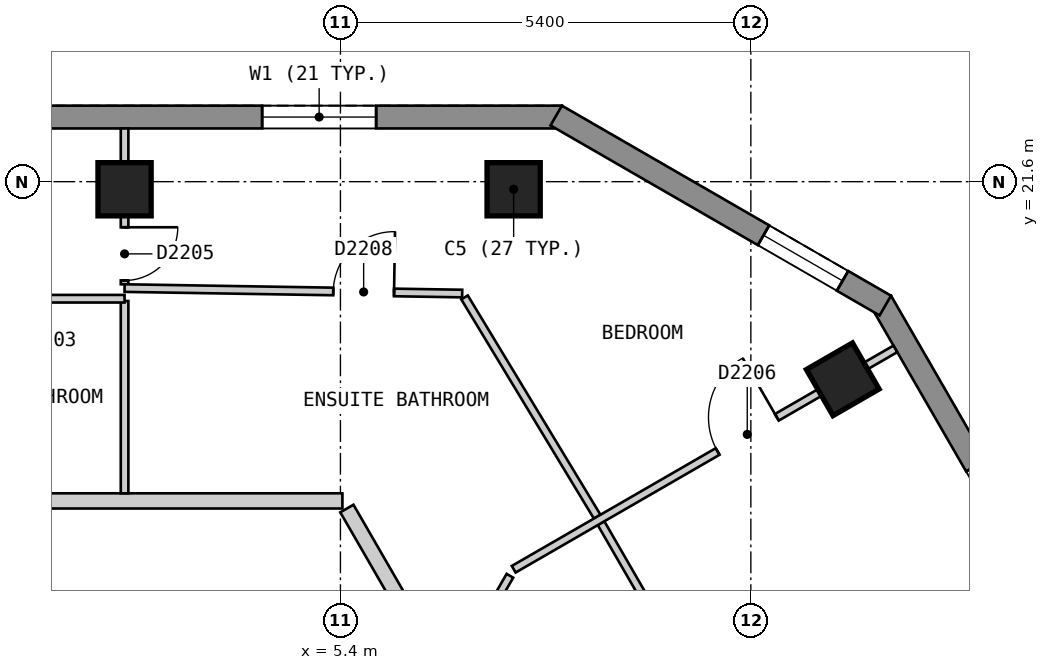
"""IFC4 building model, lengths in metres.
Left out: names, types, materials, properties, quantities, classifications, styles, units other than length and angle.
Written with IfcOpenShell. Run it as: python <this file> out.ifc"""

import sys

from ifc_helpers import new_model, si_unit, direction, frame, frame_2d, origin, origin_2d, place, context, subcontext, project, spatial, polyline, rectangle, outline, extrude, element, fill, save


model = new_model("IFC4")
c1 = context("Model", 3, precision=1e-05, world=origin(), true_north=direction((0.0, 1.0)))
c2 = subcontext(c1, "Body", "Model", "MODEL_VIEW")
j1 = project(units=[si_unit("LENGTHUNIT", "METRE"), si_unit("PLANEANGLEUNIT", "RADIAN")], contexts=[c1])
p1 = place(None, origin())
s1 = spatial("IfcSite", under=j1, at=p1, CompositionType="ELEMENT")
p2 = place(p1, origin())
s2 = spatial("IfcBuilding", under=s1, at=p2, CompositionType="ELEMENT")
p3 = place(p2, frame((0.0, 0.0, 223.8)))
s3 = spatial("IfcBuildingStorey", under=s2, at=p3, CompositionType="ELEMENT", Elevation=223.8)
for number, where, z_axis, x_axis in (
    (1, (7.679, 21.5, 0.0), (0.0, 0.0, 1.0), (-1.0, 0.0, 0.0)),
    (2, (2.56, 21.5, 0.0), (0.0, 0.0, 1.0), (-1.0, 0.0, 0.0)),
    (3, (12.009, 19.0, 0.0), (0.0, 0.0, 1.0), (-0.5, 0.866, 0.0)),
):
    element("IfcColumn", number, at=place(p3, frame(where, z_axis=z_axis, x_axis=x_axis)), inside=s3, PredefinedType="COLUMN", context=c2, shape_type="SweptSolid", body=[
        extrude(rectangle(XDim=0.7, YDim=0.7, at=origin_2d()), origin(), (0.0, 0.0, 1.0), 3.0),
    ])
p4 = place(p3, frame((8.314, 22.45, 0.0), z_axis=(0.0, 0.0, 1.0), x_axis=(-1.0, 0.0, 0.0)))
e4 = element("IfcWall", 4, at=p4, inside=s3, PredefinedType="SOLIDWALL", context=c2, shape_type="SweptSolid", body=[
    extrude(outline(polyline([(0.0, -0.15), (16.628, -0.15), (16.548, 0.15), (0.08, 0.15), (0.0, -0.15)])), origin(), (0.0, 0.0, 1.0), 2.7),
])
p5 = place(p4, frame((2.444, 0.0, 0.15)))
e5 = element("IfcOpeningElement", 5, at=p5, cuts=e4, PredefinedType="OPENING", context=c2, shape_type="SweptSolid", body=[
    extrude(rectangle(XDim=1.5, YDim=2.1, at=frame_2d((0.75, 1.05))), frame((0.0, 0.16, 0.0), z_axis=(0.0, -1.0, 0.0), x_axis=(1.0, 0.0, 0.0)), (0.0, 0.0, 1.0), 0.32),
])
p6 = place(p4, frame((7.564, 0.0, 0.15)))
e6 = element("IfcOpeningElement", 6, at=p6, cuts=e4, PredefinedType="OPENING", context=c2, shape_type="SweptSolid", body=[
    extrude(rectangle(XDim=1.5, YDim=2.1, at=frame_2d((0.75, 1.05))), frame((0.0, 0.16, 0.0), z_axis=(0.0, -1.0, 0.0), x_axis=(1.0, 0.0, 0.0)), (0.0, 0.0, 1.0), 0.32),
])
p7 = place(p4, frame((12.683, 0.0, 0.15)))
e7 = element("IfcOpeningElement", 7, at=p7, cuts=e4, PredefinedType="OPENING", context=c2, shape_type="SweptSolid", body=[
    extrude(rectangle(XDim=1.5, YDim=2.1, at=frame_2d((0.75, 1.05))), frame((0.0, 0.16, 0.0), z_axis=(0.0, -1.0, 0.0), x_axis=(1.0, 0.0, 0.0)), (0.0, 0.0, 1.0), 0.32),
])
p8 = place(p3, frame((23.599, 0.825, 0.0), z_axis=(0.0, 0.0, 1.0), x_axis=(-0.500003656944, 0.866023292436, 0.0)))
e8 = element("IfcWall", 8, at=p8, inside=s3, PredefinedType="SOLIDWALL", context=c2, shape_type="SweptSolid", body=[
    extrude(outline(polyline([(0.0, -0.15), (22.17, -0.15), (22.09, 0.15), (0.08, 0.15), (0.0, -0.15)])), origin(), (0.0, 0.0, 1.0), 2.7),
])
p9 = place(p8, frame((2.497, 0.0, 0.15)))
e9 = element("IfcOpeningElement", 9, at=p9, cuts=e8, PredefinedType="OPENING", context=c2, shape_type="SweptSolid", body=[
    extrude(rectangle(XDim=1.5, YDim=2.1, at=frame_2d((0.75, 1.05))), frame((0.0, 0.16, 0.0), z_axis=(0.0, -1.0, 0.0), x_axis=(1.0, 0.0, 0.0)), (0.0, 0.0, 1.0), 0.32),
])
p10 = place(p8, frame((7.723, 0.0, 0.15)))
e10 = element("IfcOpeningElement", 10, at=p10, cuts=e8, PredefinedType="OPENING", context=c2, shape_type="SweptSolid", body=[
    extrude(rectangle(XDim=1.5, YDim=2.1, at=frame_2d((0.75, 1.05))), frame((0.0, 0.16, 0.0), z_axis=(0.0, -1.0, 0.0), x_axis=(1.0, 0.0, 0.0)), (0.0, 0.0, 1.0), 0.32),
])
p11 = place(p8, frame((12.948, 0.0, 0.15)))
e11 = element("IfcOpeningElement", 11, at=p11, cuts=e8, PredefinedType="OPENING", context=c2, shape_type="SweptSolid", body=[
    extrude(rectangle(XDim=1.5, YDim=2.1, at=frame_2d((0.75, 1.05))), frame((0.0, 0.16, 0.0), z_axis=(0.0, -1.0, 0.0), x_axis=(1.0, 0.0, 0.0)), (0.0, 0.0, 1.0), 0.32),
])
p12 = place(p8, frame((18.173, 0.0, 0.15)))
e12 = element("IfcOpeningElement", 12, at=p12, cuts=e8, PredefinedType="OPENING", context=c2, shape_type="SweptSolid", body=[
    extrude(rectangle(XDim=1.5, YDim=2.1, at=frame_2d((0.75, 1.05))), frame((0.0, 0.16, 0.0), z_axis=(0.0, -1.0, 0.0), x_axis=(1.0, 0.0, 0.0)), (0.0, 0.0, 1.0), 0.32),
])
p13 = place(p3, frame((12.569, 19.97, 0.0), z_axis=(0.0, 0.0, 1.0), x_axis=(-0.866022959057, 0.500004234368, 0.0)))
e13 = element("IfcWall", 13, at=p13, inside=s3, PredefinedType="SOLIDWALL", context=c2, shape_type="SweptSolid", body=[
    extrude(outline(polyline([(0.0, -0.15), (5.0, -0.15), (4.92, 0.15), (0.08, 0.15), (0.0, -0.15)])), origin(), (0.0, 0.0, 1.0), 2.7),
])
p14 = place(p13, frame((0.65, 0.0, 0.15)))
e14 = element("IfcOpeningElement", 14, at=p14, cuts=e13, PredefinedType="OPENING", context=c2, shape_type="SweptSolid", body=[
    extrude(rectangle(XDim=1.2, YDim=2.1, at=frame_2d((0.6, 1.05))), frame((0.0, 0.16, 0.0), z_axis=(0.0, -1.0, 0.0), x_axis=(1.0, 0.0, 0.0)), (0.0, 0.0, 1.0), 0.32),
])
p15 = place(p3, frame((5.485, 17.3, 0.0), z_axis=(0.0, 0.0, 1.0), x_axis=(0.500017221754, -0.866015460572, 0.0)))
e15 = element("IfcWall", 15, at=p15, inside=s3, PredefinedType="PARTITIONING", context=c2, shape_type="SweptSolid", body=[
    extrude(rectangle(XDim=10.468, YDim=0.2, at=frame_2d((5.234, 0.0))), origin(), (0.0, 0.0, 1.0), 2.7),
])
p16 = place(p15, frame((9.092, 0.0, 0.0)))
e16 = element("IfcOpeningElement", 16, at=p16, cuts=e15, PredefinedType="OPENING", context=c2, shape_type="SweptSolid", body=[
    extrude(rectangle(XDim=1.0, YDim=2.1, at=frame_2d((0.5, 1.05))), frame((0.0, 0.11, 0.0), z_axis=(0.0, -1.0, 0.0), x_axis=(1.0, 0.0, 0.0)), (0.0, 0.0, 1.0), 0.22),
])
p17 = place(p3, frame((-5.311, 17.4, 0.0), z_axis=(0.0, 0.0, 1.0), x_axis=(1.0, 0.0, 0.0)))
e17 = element("IfcWall", 17, at=p17, inside=s3, PredefinedType="PARTITIONING", context=c2, shape_type="SweptSolid", body=[
    extrude(rectangle(XDim=10.737, YDim=0.2, at=frame_2d((5.369, 0.0))), origin(), (0.0, 0.0, 1.0), 2.7),
])
p18 = place(p17, frame((4.812, 0.0, 0.0)))
e18 = element("IfcOpeningElement", 18, at=p18, cuts=e17, PredefinedType="OPENING", context=c2, shape_type="SweptSolid", body=[
    extrude(rectangle(XDim=1.0, YDim=2.1, at=frame_2d((0.5, 1.05))), frame((0.0, 0.11, 0.0), z_axis=(0.0, -1.0, 0.0), x_axis=(1.0, 0.0, 0.0)), (0.0, 0.0, 1.0), 0.22),
])
p19 = place(p3, frame((7.033, 20.077, 0.0), z_axis=(0.0, 0.0, 1.0), x_axis=(0.517730137343, -0.855543981854, 0.0)))
e19 = element("IfcWall", 19, at=p19, inside=s3, PredefinedType="PARTITIONING", context=c2, shape_type="SweptSolid", body=[
    extrude(rectangle(XDim=3.371, YDim=0.1, at=frame_2d((1.685, 0.0))), origin(), (0.0, 0.0, 1.0), 2.7),
])
p20 = place(p3, frame((8.829, 17.107, 0.0), z_axis=(0.0, 0.0, 1.0), x_axis=(0.500035512416, -0.866004899711, 0.0)))
e20 = element("IfcWall", 20, at=p20, inside=s3, PredefinedType="PARTITIONING", context=c2, shape_type="SweptSolid", body=[
    extrude(rectangle(XDim=5.175, YDim=0.1, at=frame_2d((2.588, 0.0))), origin(), (0.0, 0.0, 1.0), 2.7),
])
p21 = place(p20, frame((2.163, 0.0, 0.0)))
e21 = element("IfcOpeningElement", 21, at=p21, cuts=e20, PredefinedType="OPENING", context=c2, shape_type="SweptSolid", body=[
    extrude(rectangle(XDim=0.8, YDim=2.1, at=frame_2d((0.4, 1.05))), frame((0.0, 0.06, 0.0), z_axis=(0.0, -1.0, 0.0), x_axis=(1.0, 0.0, 0.0)), (0.0, 0.0, 1.0), 0.12),
])
p22 = place(p3, frame((2.56, 22.3, 0.0), z_axis=(0.0, 0.0, 1.0), x_axis=(0.0, -1.0, 0.0)))
e22 = element("IfcWall", 22, at=p22, inside=s3, PredefinedType="PARTITIONING", context=c2, shape_type="SweptSolid", body=[
    extrude(rectangle(XDim=2.05, YDim=0.1, at=frame_2d((1.025, 0.0))), origin(), (0.0, 0.0, 1.0), 2.7),
])
p23 = place(p22, frame((1.3, 0.0, 0.0)))
e23 = element("IfcOpeningElement", 23, at=p23, cuts=e22, PredefinedType="OPENING", context=c2, shape_type="SweptSolid", body=[
    extrude(rectangle(XDim=0.7, YDim=2.1, at=frame_2d((0.35, 1.05))), frame((0.0, 0.06, 0.0), z_axis=(0.0, -1.0, 0.0), x_axis=(1.0, 0.0, 0.0)), (0.0, 0.0, 1.0), 0.12),
])
p24 = place(p3, frame((2.56, 20.03, 0.0), z_axis=(0.0, 0.0, 1.0), x_axis=(0.0, -1.0, 0.0)))
e24 = element("IfcWall", 24, at=p24, inside=s3, PredefinedType="PARTITIONING", context=c2, shape_type="SweptSolid", body=[
    extrude(rectangle(XDim=2.53, YDim=0.1, at=frame_2d((1.265, 0.0))), origin(), (0.0, 0.0, 1.0), 2.7),
])
p25 = place(p3, frame((2.56, 20.2, 0.0), z_axis=(0.0, 0.0, 1.0), x_axis=(0.999868576801, -0.016212005615, 0.0)))
e25 = element("IfcWall", 25, at=p25, inside=s3, PredefinedType="PARTITIONING", context=c2, shape_type="SweptSolid", body=[
    extrude(rectangle(XDim=4.442, YDim=0.1, at=frame_2d((2.221, 0.0))), origin(), (0.0, 0.0, 1.0), 2.7),
])
p26 = place(p25, frame((2.746, 0.0, 0.0)))
e26 = element("IfcOpeningElement", 26, at=p26, cuts=e25, PredefinedType="OPENING", context=c2, shape_type="SweptSolid", body=[
    extrude(rectangle(XDim=0.8, YDim=2.1, at=frame_2d((0.4, 1.05))), frame((0.0, 0.06, 0.0), z_axis=(0.0, -1.0, 0.0), x_axis=(1.0, 0.0, 0.0)), (0.0, 0.0, 1.0), 0.12),
])
p27 = place(p3, frame((-0.716, 20.06, 0.0), z_axis=(0.0, 0.0, 1.0), x_axis=(1.0, 0.0, 0.0)))
e27 = element("IfcWall", 27, at=p27, inside=s3, PredefinedType="PARTITIONING", context=c2, shape_type="SweptSolid", body=[
    extrude(rectangle(XDim=3.276, YDim=0.1, at=frame_2d((1.638, 0.0))), origin(), (0.0, 0.0, 1.0), 2.7),
])
p28 = place(p3, frame((6.871, 15.1, 0.0), z_axis=(0.0, 0.0, 1.0), x_axis=(0.499805980977, 0.866137391745, 0.0)))
e28 = element("IfcWall", 28, at=p28, inside=s3, PredefinedType="PARTITIONING", context=c2, shape_type="SweptSolid", body=[
    extrude(rectangle(XDim=1.518, YDim=0.1, at=frame_2d((0.759, 0.0))), origin(), (0.0, 0.0, 1.0), 2.7),
])
p29 = place(p3, frame((7.68, 16.501, 0.0), z_axis=(0.0, 0.0, 1.0), x_axis=(0.86602149507, 0.500006770031, 0.0)))
e29 = element("IfcWall", 29, at=p29, inside=s3, PredefinedType="PARTITIONING", context=c2, shape_type="SweptSolid", body=[
    extrude(rectangle(XDim=5.798, YDim=0.1, at=frame_2d((2.899, 0.0))), origin(), (0.0, 0.0, 1.0), 2.7),
])
p30 = place(p29, frame((3.098, 0.0, 0.0)))
e30 = element("IfcOpeningElement", 30, at=p30, cuts=e29, PredefinedType="OPENING", context=c2, shape_type="SweptSolid", body=[
    extrude(rectangle(XDim=0.9, YDim=2.1, at=frame_2d((0.45, 1.05))), frame((0.0, 0.06, 0.0), z_axis=(0.0, -1.0, 0.0), x_axis=(1.0, 0.0, 0.0)), (0.0, 0.0, 1.0), 0.12),
])
p31 = place(p5, origin())
e31 = element("IfcWindow", 31, at=p31, inside=s3, PartitioningType="SINGLE_PANEL", PredefinedType="WINDOW", context=c2, shape_type="SweptSolid", body=[
    extrude(rectangle(XDim=1.5, YDim=2.1, at=frame_2d((0.75, 1.05))), frame((0.0, 0.03, 0.0), z_axis=(0.0, -1.0, 0.0), x_axis=(1.0, 0.0, 0.0)), (0.0, 0.0, 1.0), 0.06),
])
fill(e5, e31)
p32 = place(p14, origin())
e32 = element("IfcWindow", 32, at=p32, inside=s3, PartitioningType="SINGLE_PANEL", PredefinedType="WINDOW", context=c2, shape_type="SweptSolid", body=[
    extrude(rectangle(XDim=1.2, YDim=2.1, at=frame_2d((0.6, 1.05))), frame((0.0, 0.03, 0.0), z_axis=(0.0, -1.0, 0.0), x_axis=(1.0, 0.0, 0.0)), (0.0, 0.0, 1.0), 0.06),
])
fill(e14, e32)
p33 = place(p23, origin())
e33 = element("IfcDoor", 33, at=p33, inside=s3, OperationType="SINGLE_SWING_LEFT", PredefinedType="DOOR", context=c2, shape_type="SweptSolid", body=[
    extrude(rectangle(XDim=0.7, YDim=2.1, at=frame_2d((0.35, 1.05))), frame((0.0, 0.025, 0.0), z_axis=(0.0, -1.0, 0.0), x_axis=(1.0, 0.0, 0.0)), (0.0, 0.0, 1.0), 0.05),
])
fill(e23, e33)
p34 = place(p30, origin())
e34 = element("IfcDoor", 34, at=p34, inside=s3, OperationType="SINGLE_SWING_RIGHT", PredefinedType="DOOR", context=c2, shape_type="SweptSolid", body=[
    extrude(rectangle(XDim=0.9, YDim=2.1, at=frame_2d((0.45, 1.05))), frame((0.0, 0.025, 0.0), z_axis=(0.0, -1.0, 0.0), x_axis=(1.0, 0.0, 0.0)), (0.0, 0.0, 1.0), 0.05),
])
fill(e30, e34)
p35 = place(p26, origin())
e35 = element("IfcDoor", 35, at=p35, inside=s3, OperationType="SINGLE_SWING_RIGHT", PredefinedType="DOOR", context=c2, shape_type="SweptSolid", body=[
    extrude(rectangle(XDim=0.8, YDim=2.1, at=frame_2d((0.4, 1.05))), frame((0.0, 0.025, 0.0), z_axis=(0.0, -1.0, 0.0), x_axis=(1.0, 0.0, 0.0)), (0.0, 0.0, 1.0), 0.05),
])
fill(e26, e35)
save(model, sys.argv[1])
